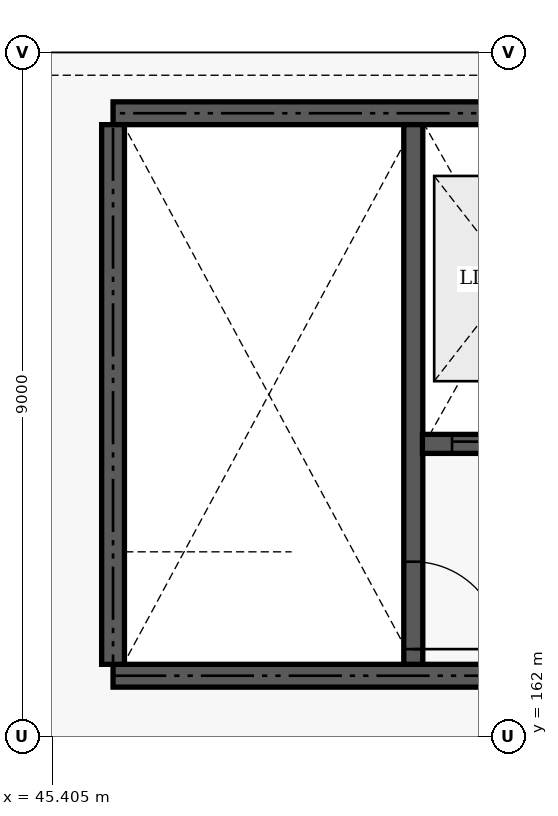
"""IFC4 building model, lengths in metres.
Left out: names, types, materials, properties, quantities, classifications, styles, units other than length and angle.
Written with IfcOpenShell. Run it as: python <this file> out.ifc"""

import sys

from ifc_helpers import new_model, si_unit, direction, frame, frame_2d, origin, place, context, subcontext, project, spatial, rectangle, extrude, element, fill, save


model = new_model("IFC4")
c1 = context("Model", 3, precision=1e-05, world=origin(), true_north=direction((0.0, 1.0)))
c2 = subcontext(c1, "Body", "Model", "MODEL_VIEW")
j1 = project(units=[si_unit("LENGTHUNIT", "METRE"), si_unit("PLANEANGLEUNIT", "RADIAN")], contexts=[c1])
p1 = place(None, origin())
s1 = spatial("IfcSite", under=j1, at=p1, CompositionType="ELEMENT")
p2 = place(p1, origin())
s2 = spatial("IfcBuilding", under=s1, at=p2, CompositionType="ELEMENT")
p3 = place(p2, frame((0.0, 0.0, 13.5)))
s3 = spatial("IfcBuildingStorey", under=s2, at=p3, CompositionType="ELEMENT", Elevation=13.5)
for number, where, z_axis, x_axis in (
    (1, (46.2, 162.8, 0.0), (0.0, 0.0, 1.0), (1.0, 0.0, 0.0)),
    (2, (46.2, 170.2, 0.0), (0.0, 0.0, 1.0), (1.0, 0.0, 0.0)),
):
    element("IfcWall", number, at=place(p3, frame(where, z_axis=z_axis, x_axis=x_axis)), inside=s3, PredefinedType="SHEAR", context=c2, shape_type="SweptSolid", body=[
        extrude(rectangle(XDim=6.6, YDim=0.3, at=frame_2d((3.3, 0.0))), origin(), (0.0, 0.0, 1.0), 3.7),
    ])
p4 = place(p3, frame((46.2, 162.95, 0.0), z_axis=(0.0, 0.0, 1.0), x_axis=(0.0, 1.0, 0.0)))
e3 = element("IfcWall", 3, at=p4, inside=s3, PredefinedType="SHEAR", context=c2, shape_type="SweptSolid", body=[
    extrude(rectangle(XDim=7.1, YDim=0.3, at=frame_2d((3.55, 0.0))), origin(), (0.0, 0.0, 1.0), 3.7),
])
p5 = place(p3, frame((50.15, 162.95, 0.0), z_axis=(0.0, 0.0, 1.0), x_axis=(0.0, 1.0, 0.0)))
e4 = element("IfcWall", 4, at=p5, inside=s3, PredefinedType="SHEAR", context=c2, shape_type="SweptSolid", body=[
    extrude(rectangle(XDim=7.1, YDim=0.25, at=frame_2d((3.55, 0.0))), origin(), (0.0, 0.0, 1.0), 3.7),
])
p6 = place(p5, frame((0.2, 0.0, 0.0)))
e5 = element("IfcOpeningElement", 5, at=p6, cuts=e4, PredefinedType="OPENING", context=c2, shape_type="SweptSolid", body=[
    extrude(rectangle(XDim=1.15, YDim=2.15, at=frame_2d((0.575, 1.075))), frame((0.0, 0.135, 0.0), z_axis=(0.0, -1.0, 0.0), x_axis=(1.0, 0.0, 0.0)), (0.0, 0.0, 1.0), 0.27),
])
p7 = place(p3, frame((50.27, 165.85, 0.0), z_axis=(0.0, 0.0, 1.0), x_axis=(1.0, 0.0, 0.0)))
e6 = element("IfcWall", 6, at=p7, inside=s3, PredefinedType="SHEAR", context=c2, shape_type="SweptSolid", body=[
    extrude(rectangle(XDim=2.38, YDim=0.25, at=frame_2d((1.19, 0.0))), origin(), (0.0, 0.0, 1.0), 3.7),
])
p8 = place(p7, frame((0.39, 0.0, 0.0)))
e7 = element("IfcOpeningElement", 7, at=p8, cuts=e6, PredefinedType="OPENING", context=c2, shape_type="SweptSolid", body=[
    extrude(rectangle(XDim=1.6, YDim=2.3, at=frame_2d((0.8, 1.15))), frame((0.0, 0.135, 0.0), z_axis=(0.0, -1.0, 0.0), x_axis=(1.0, 0.0, 0.0)), (0.0, 0.0, 1.0), 0.27),
])
p9 = place(p6, frame((1.15, 0.0, 0.0), z_axis=(0.0, 0.0, 1.0), x_axis=(-1.0, 0.0, 0.0)))
e8 = element("IfcDoor", 8, at=p9, inside=s3, OperationType="SINGLE_SWING_LEFT", PredefinedType="DOOR", context=c2, shape_type="SweptSolid", body=[
    extrude(rectangle(XDim=1.15, YDim=2.15, at=frame_2d((0.575, 1.075))), frame((0.0, 0.025, 0.0), z_axis=(0.0, -1.0, 0.0), x_axis=(1.0, 0.0, 0.0)), (0.0, 0.0, 1.0), 0.05),
])
fill(e5, e8)
p10 = place(p8, origin())
e9 = element("IfcDoor", 9, at=p10, inside=s3, OperationType="SLIDING_TO_LEFT", PredefinedType="DOOR", context=c2, shape_type="SweptSolid", body=[
    extrude(rectangle(XDim=1.6, YDim=2.3, at=frame_2d((0.8, 1.15))), frame((0.0, 0.025, 0.0), z_axis=(0.0, -1.0, 0.0), x_axis=(1.0, 0.0, 0.0)), (0.0, 0.0, 1.0), 0.05),
])
fill(e7, e9)
save(model, sys.argv[1])
